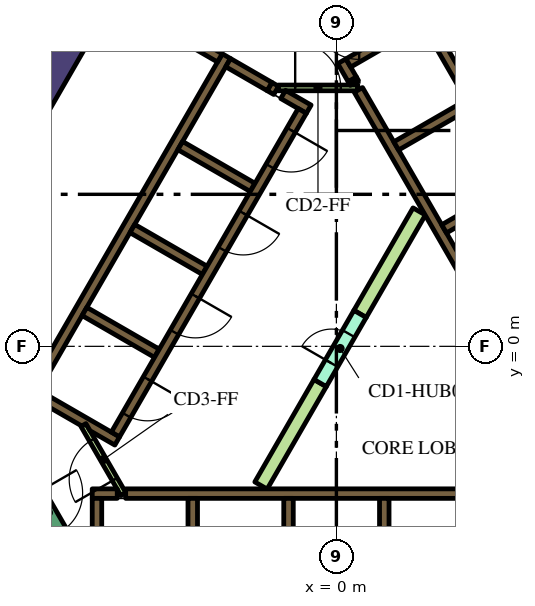
"""IFC4 building model, lengths in metres.
Left out: names, types, materials, properties, quantities, classifications, styles, units other than length and angle.
Written with IfcOpenShell. Run it as: python <this file> out.ifc"""

import sys

from ifc_helpers import new_model, si_unit, direction, frame, frame_2d, origin, place, context, subcontext, project, spatial, polyline, rectangle, outline, extrude, element, fill, save


model = new_model("IFC4")
c1 = context("Model", 3, precision=1e-05, world=origin(), true_north=direction((0.0, 1.0)))
c2 = subcontext(c1, "Body", "Model", "MODEL_VIEW")
j1 = project(units=[si_unit("LENGTHUNIT", "METRE"), si_unit("PLANEANGLEUNIT", "RADIAN")], contexts=[c1])
p1 = place(None, origin())
s1 = spatial("IfcSite", under=j1, at=p1, CompositionType="ELEMENT")
p2 = place(p1, origin())
s2 = spatial("IfcBuilding", under=s1, at=p2, CompositionType="ELEMENT")
p3 = place(p2, frame((0.0, 0.0, 179.4)))
s3 = spatial("IfcBuildingStorey", under=s2, at=p3, CompositionType="ELEMENT", Elevation=179.4)
p4 = place(p3, frame((-12.668, -1.842, 0.0), z_axis=(0.0, 0.0, 1.0), x_axis=(0.500003640647, 0.866023301845, 0.0)))
e1 = element("IfcWall", 1, at=p4, inside=s3, PredefinedType="SOLIDWALL", context=c2, shape_type="SweptSolid", body=[
    extrude(rectangle(XDim=15.858, YDim=0.8, at=frame_2d((7.929, 0.0))), origin(), (0.0, 0.0, 1.0), 4.2),
])
p5 = place(p3, frame((-5.545, -3.875, 0.0), z_axis=(0.0, 0.0, 1.0), x_axis=(1.0, 0.0, 0.0)))
e2 = element("IfcWall", 2, at=p5, inside=s3, PredefinedType="SOLIDWALL", context=c2, shape_type="SweptSolid", body=[
    extrude(rectangle(XDim=11.97, YDim=0.25, at=frame_2d((5.985, 0.0))), origin(), (0.0, 0.0, 1.0), 4.2),
])
p6 = place(p3, frame((-6.425, -3.875, 0.0), z_axis=(0.0, 0.0, 1.0), x_axis=(1.0, 0.0, 0.0)))
e3 = element("IfcWall", 3, at=p6, inside=s3, PredefinedType="SOLIDWALL", context=c2, shape_type="SweptSolid", body=[
    extrude(rectangle(XDim=0.658, YDim=0.25, at=frame_2d((0.329, 0.0))), origin(), (0.0, 0.0, 1.0), 4.2),
])
for number, where, z_axis, x_axis in (
    (4, (1.26, -4.0, 0.0), (0.0, 0.0, 1.0), (0.0, -1.0, 0.0)),
    (5, (-1.26, -4.0, 0.0), (0.0, 0.0, 1.0), (0.0, -1.0, 0.0)),
    (6, (-3.78, -4.0, 0.0), (0.0, 0.0, 1.0), (0.0, -1.0, 0.0)),
):
    element("IfcWall", number, at=place(p3, frame(where, z_axis=z_axis, x_axis=x_axis)), inside=s3, PredefinedType="SOLIDWALL", context=c2, shape_type="SweptSolid", body=[
        extrude(rectangle(XDim=2.2, YDim=0.25, at=frame_2d((1.1, 0.0))), origin(), (0.0, 0.0, 1.0), 4.2),
    ])
p7 = place(p3, frame((-6.3, -7.125, 0.0), z_axis=(0.0, 0.0, 1.0), x_axis=(0.0, 1.0, 0.0)))
e7 = element("IfcWall", 7, at=p7, inside=s3, PredefinedType="SOLIDWALL", context=c2, shape_type="SweptSolid", body=[
    extrude(rectangle(XDim=3.125, YDim=0.25, at=frame_2d((1.562, 0.0))), origin(), (0.0, 0.0, 1.0), 4.2),
])
p8 = place(p3, frame((0.473, 6.93, 0.0), z_axis=(0.0, 0.0, 1.0), x_axis=(-0.49972245349, 0.866185586049, 0.0)))
e8 = element("IfcWall", 8, at=p8, inside=s3, PredefinedType="SOLIDWALL", context=c2, shape_type="SweptSolid", body=[
    extrude(rectangle(XDim=0.11, YDim=0.25, at=frame_2d((0.055, 0.0))), origin(), (0.0, 0.0, 1.0), 4.2),
])
p9 = place(p3, frame((6.568, -3.627, 0.0), z_axis=(0.0, 0.0, 1.0), x_axis=(-0.499999455981, 0.866025717874, 0.0)))
e9 = element("IfcWall", 9, at=p9, inside=s3, PredefinedType="SOLIDWALL", context=c2, shape_type="SweptSolid", body=[
    extrude(rectangle(XDim=11.978, YDim=0.25, at=frame_2d((5.989, 0.0))), origin(), (0.0, 0.0, 1.0), 4.2),
])
p10 = place(p3, frame((0.417, 7.027, 0.0), z_axis=(0.0, 0.0, 1.0), x_axis=(-0.500210807569, 0.865903659763, 0.0)))
e10 = element("IfcWall", 10, at=p10, inside=s3, PredefinedType="SOLIDWALL", context=c2, shape_type="SweptSolid", body=[
    extrude(rectangle(XDim=0.548, YDim=0.25, at=frame_2d((0.274, 0.0))), origin(), (0.0, 0.0, 1.0), 4.2),
])
p11 = place(p3, frame((3.647, 9.38, 0.0), z_axis=(0.0, 0.0, 1.0), x_axis=(-0.866025015791, -0.500000672024, 0.0)))
e11 = element("IfcWall", 11, at=p11, inside=s3, PredefinedType="SOLIDWALL", context=c2, shape_type="SweptSolid", body=[
    extrude(rectangle(XDim=3.849, YDim=0.25, at=frame_2d((1.924, 0.0))), origin(), (0.0, 0.0, 1.0), 4.2),
])
p12 = place(p3, frame((1.574, 5.274, 0.0), z_axis=(0.0, 0.0, 1.0), x_axis=(0.866028486751, 0.499994660107, 0.0)))
e12 = element("IfcWall", 12, at=p12, inside=s3, PredefinedType="SOLIDWALL", context=c2, shape_type="SweptSolid", body=[
    extrude(rectangle(XDim=2.2, YDim=0.25, at=frame_2d((1.1, 0.0))), origin(), (0.0, 0.0, 1.0), 4.2),
])
p13 = place(p3, frame((2.834, 3.091, 0.0), z_axis=(0.0, 0.0, 1.0), x_axis=(0.866008176907, 0.50002983664, 0.0)))
e13 = element("IfcWall", 13, at=p13, inside=s3, PredefinedType="SOLIDWALL", context=c2, shape_type="SweptSolid", body=[
    extrude(rectangle(XDim=2.2, YDim=0.25, at=frame_2d((1.1, 0.0))), origin(), (0.0, 0.0, 1.0), 4.2),
])
p14 = place(p3, frame((-8.06, -1.311, 0.0), z_axis=(0.0, 0.0, 1.0), x_axis=(0.50000273126, 0.866023826885, 0.0)))
e14 = element("IfcWall", 14, at=p14, inside=s3, PredefinedType="SOLIDWALL", context=c2, shape_type="SweptSolid", body=[
    extrude(rectangle(XDim=10.33, YDim=0.25, at=frame_2d((5.165, 0.0))), origin(), (0.0, 0.0, 1.0), 4.2),
])
p15 = place(p3, frame((-1.758, 6.835, 0.0), z_axis=(0.0, 0.0, 1.0), x_axis=(0.865982457891, -0.500074377092, 0.0)))
e15 = element("IfcWall", 15, at=p15, inside=s3, PredefinedType="SOLIDWALL", context=c2, shape_type="SweptSolid", body=[
    extrude(rectangle(XDim=0.2, YDim=0.25, at=frame_2d((0.1, 0.0))), origin(), (0.0, 0.0, 1.0), 4.2),
])
p16 = place(p3, frame((-1.76, 6.836, 0.0), z_axis=(0.0, 0.0, 1.0), x_axis=(-0.865952863304, 0.500125622755, 0.0)))
e16 = element("IfcWall", 16, at=p16, inside=s3, PredefinedType="SOLIDWALL", context=c2, shape_type="SweptSolid", body=[
    extrude(rectangle(XDim=1.258, YDim=0.25, at=frame_2d((0.629, 0.0))), origin(), (0.0, 0.0, 1.0), 4.2),
])
p17 = place(p3, frame((-0.728, 6.24, 0.0), z_axis=(0.0, 0.0, 1.0), x_axis=(-0.865955664968, 0.500120771724, 0.0)))
e17 = element("IfcWall", 17, at=p17, inside=s3, PredefinedType="SOLIDWALL", context=c2, shape_type="SweptSolid", body=[
    extrude(rectangle(XDim=0.778, YDim=0.25, at=frame_2d((0.389, 0.0))), origin(), (0.0, 0.0, 1.0), 4.2),
])
for number, where, z_axis, x_axis in (
    (18, (-2.204, 4.182, 0.0), (0.0, 0.0, 1.0), (-0.866, 0.5, 0.0)),
    (19, (-5.369, 3.1, 0.0), (0.0, 0.0, 1.0), (0.866, -0.5, 0.0)),
    (20, (-4.724, -0.182, 0.0), (0.0, 0.0, 1.0), (-0.866, 0.5, 0.0)),
):
    element("IfcWall", number, at=place(p3, frame(where, z_axis=z_axis, x_axis=x_axis)), inside=s3, PredefinedType="SOLIDWALL", context=c2, shape_type="SweptSolid", body=[
        extrude(rectangle(XDim=2.2, YDim=0.25, at=frame_2d((1.1, 0.0))), origin(), (0.0, 0.0, 1.0), 4.2),
    ])
p18 = place(p3, origin())
e21 = element("IfcWall", 21, at=p18, inside=s3, PredefinedType="SOLIDWALL", context=c2, shape_type="SweptSolid", body=[
    extrude(outline(polyline([(-5.922, -2.257), (-5.922, -2.257), (-5.705, -2.382), (-5.83, -2.598), (-6.483, -2.221), (-6.591, -2.033), (-6.591, -2.033), (-6.7, -2.096), (-7.952, -1.373), (-7.827, -1.156), (-5.922, -2.257)])), origin(), (0.0, 0.0, 1.0), 4.2),
])
p19 = place(p3, frame((-3.066, 7.59, 0.0), z_axis=(0.0, 0.0, 1.0), x_axis=(-0.866081358704, 0.49990307071, 0.0)))
e22 = element("IfcWall", 22, at=p19, inside=s3, PredefinedType="SOLIDWALL", context=c2, shape_type="SweptSolid", body=[
    extrude(rectangle(XDim=0.858, YDim=0.25, at=frame_2d((0.429, 0.0))), origin(), (0.0, 0.0, 1.0), 4.2),
])
e23 = element("IfcWall", 23, at=p18, inside=s3, PredefinedType="PARTITIONING", context=c2, shape_type="SweptSolid", body=[
    extrude(outline(polyline([(2.017, 3.643), (2.342, 3.456), (0.785, 0.76), (0.46, 0.947), (2.017, 3.643)])), origin(), (0.0, 0.0, 1.0), 3.15),
])
e24 = element("IfcWall", 24, at=p18, inside=s3, PredefinedType="PARTITIONING", context=c2, shape_type="SweptSolid", body=[
    extrude(outline(polyline([(-0.59, -0.872), (-0.265, -1.059), (-1.822, -3.756), (-2.147, -3.568), (-0.59, -0.872)])), origin(), (0.0, 0.0, 1.0), 3.15),
])
p20 = place(p3, frame((8.565, -2.185, 0.0), z_axis=(0.0, 0.0, 1.0), x_axis=(-0.499997954832, 0.866026584559, 0.0)))
e25 = element("IfcWall", 25, at=p20, inside=s3, PredefinedType="SOLIDWALL", context=c2, shape_type="SweptSolid", body=[
    extrude(rectangle(XDim=12.35, YDim=0.25, at=frame_2d((6.175, 0.0))), origin(), (0.0, 0.0, 1.0), 4.2),
])
p21 = place(p20, frame((0.585, 0.0, 0.0)))
e26 = element("IfcOpeningElement", 26, at=p21, cuts=e25, PredefinedType="OPENING", context=c2, shape_type="SweptSolid", body=[
    extrude(rectangle(XDim=1.1, YDim=2.1, at=frame_2d((0.55, 1.05))), frame((0.0, 0.135, 0.0), z_axis=(0.0, -1.0, 0.0), x_axis=(1.0, 0.0, 0.0)), (0.0, 0.0, 1.0), 0.27),
])
p22 = place(p3, frame((-0.898, 6.194, 0.0), z_axis=(0.0, 0.0, 1.0), x_axis=(-0.499996202215, -0.866027596426, 0.0)))
e27 = element("IfcWall", 27, at=p22, inside=s3, PredefinedType="SOLIDWALL", context=c2, shape_type="SweptSolid", body=[
    extrude(rectangle(XDim=9.83, YDim=0.25, at=frame_2d((4.915, 0.0))), origin(), (0.0, 0.0, 1.0), 4.2),
])
p23 = place(p22, frame((0.585, 0.0, 0.0)))
e28 = element("IfcOpeningElement", 28, at=p23, cuts=e27, PredefinedType="OPENING", context=c2, shape_type="SweptSolid", body=[
    extrude(rectangle(XDim=1.1, YDim=2.1, at=frame_2d((0.55, 1.05))), frame((0.0, 0.135, 0.0), z_axis=(0.0, -1.0, 0.0), x_axis=(1.0, 0.0, 0.0)), (0.0, 0.0, 1.0), 0.27),
])
p24 = place(p22, frame((3.105, 0.0, 0.0)))
e29 = element("IfcOpeningElement", 29, at=p24, cuts=e27, PredefinedType="OPENING", context=c2, shape_type="SweptSolid", body=[
    extrude(rectangle(XDim=1.1, YDim=2.1, at=frame_2d((0.55, 1.05))), frame((0.0, 0.135, 0.0), z_axis=(0.0, -1.0, 0.0), x_axis=(1.0, 0.0, 0.0)), (0.0, 0.0, 1.0), 0.27),
])
p25 = place(p22, frame((5.625, 0.0, 0.0)))
e30 = element("IfcOpeningElement", 30, at=p25, cuts=e27, PredefinedType="OPENING", context=c2, shape_type="SweptSolid", body=[
    extrude(rectangle(XDim=1.1, YDim=2.1, at=frame_2d((0.55, 1.05))), frame((0.0, 0.135, 0.0), z_axis=(0.0, -1.0, 0.0), x_axis=(1.0, 0.0, 0.0)), (0.0, 0.0, 1.0), 0.27),
])
p26 = place(p22, frame((8.145, 0.0, 0.0)))
e31 = element("IfcOpeningElement", 31, at=p26, cuts=e27, PredefinedType="OPENING", context=c2, shape_type="SweptSolid", body=[
    extrude(rectangle(XDim=1.1, YDim=2.1, at=frame_2d((0.55, 1.05))), frame((0.0, 0.135, 0.0), z_axis=(0.0, -1.0, 0.0), x_axis=(1.0, 0.0, 0.0)), (0.0, 0.0, 1.0), 0.27),
])
p27 = place(p3, frame((-8.103, -3.466, 0.0), z_axis=(0.0, 0.0, 1.0), x_axis=(0.500078061341, -0.865980330357, 0.0)))
e32 = element("IfcWall", 32, at=p27, inside=s3, PredefinedType="SOLIDWALL", context=c2, shape_type="SweptSolid", body=[
    extrude(rectangle(XDim=2.1, YDim=0.4, at=frame_2d((1.05, 0.0))), origin(), (0.0, 0.0, 1.0), 4.2),
])
p28 = place(p27, frame((0.45, 0.0, 0.0)))
e33 = element("IfcOpeningElement", 33, at=p28, cuts=e32, PredefinedType="OPENING", context=c2, shape_type="SweptSolid", body=[
    extrude(rectangle(XDim=1.2, YDim=2.1, at=frame_2d((0.6, 1.05))), frame((0.0, 0.21, 0.0), z_axis=(0.0, -1.0, 0.0), x_axis=(1.0, 0.0, 0.0)), (0.0, 0.0, 1.0), 0.42),
])
p29 = place(p3, frame((-0.427, -0.966, 0.0), z_axis=(0.0, 0.0, 1.0), x_axis=(0.49994051562, 0.866059744384, 0.0)))
e34 = element("IfcWall", 34, at=p29, inside=s3, PredefinedType="PARTITIONING", context=c2, shape_type="SweptSolid", body=[
    extrude(rectangle(XDim=2.1, YDim=0.375, at=frame_2d((1.05, 0.0))), origin(), (0.0, 0.0, 1.0), 3.15),
])
p30 = place(p29, frame((0.6, 0.0, 0.0)))
e35 = element("IfcOpeningElement", 35, at=p30, cuts=e34, PredefinedType="OPENING", context=c2, shape_type="SweptSolid", body=[
    extrude(rectangle(XDim=0.9, YDim=2.1, at=frame_2d((0.45, 1.05))), frame((0.0, 0.198, 0.0), z_axis=(0.0, -1.0, 0.0), x_axis=(1.0, 0.0, 0.0)), (0.0, 0.0, 1.0), 0.395),
])
p31 = place(p3, frame((-1.534, 6.8, 0.0), z_axis=(0.0, 0.0, 1.0), x_axis=(1.0, 0.0, 0.0)))
e36 = element("IfcWall", 36, at=p31, inside=s3, PredefinedType="PARTITIONING", context=c2, shape_type="SweptSolid", body=[
    extrude(rectangle(XDim=2.1, YDim=0.15, at=frame_2d((1.05, 0.0))), origin(), (0.0, 0.0, 1.0), 3.15),
])
p32 = place(p31, frame((0.45, 0.0, 0.0)))
e37 = element("IfcOpeningElement", 37, at=p32, cuts=e36, PredefinedType="OPENING", context=c2, shape_type="SweptSolid", body=[
    extrude(rectangle(XDim=1.2, YDim=2.1, at=frame_2d((0.6, 1.05))), frame((0.0, 0.085, 0.0), z_axis=(0.0, -1.0, 0.0), x_axis=(1.0, 0.0, 0.0)), (0.0, 0.0, 1.0), 0.17),
])
p33 = place(p3, frame((-5.606, -3.89, 0.0), z_axis=(0.0, 0.0, 1.0), x_axis=(-0.500027713859, 0.866009402589, 0.0)))
e38 = element("IfcWall", 38, at=p33, inside=s3, PredefinedType="PARTITIONING", context=c2, shape_type="SweptSolid", body=[
    extrude(rectangle(XDim=2.1, YDim=0.15, at=frame_2d((1.05, 0.0))), origin(), (0.0, 0.0, 1.0), 3.15),
])
p34 = place(p33, frame((0.45, 0.0, 0.0)))
e39 = element("IfcOpeningElement", 39, at=p34, cuts=e38, PredefinedType="OPENING", context=c2, shape_type="SweptSolid", body=[
    extrude(rectangle(XDim=1.2, YDim=2.1, at=frame_2d((0.6, 1.05))), frame((0.0, 0.085, 0.0), z_axis=(0.0, -1.0, 0.0), x_axis=(1.0, 0.0, 0.0)), (0.0, 0.0, 1.0), 0.17),
])
p35 = place(p23, origin())
e40 = element("IfcDoor", 40, at=p35, inside=s3, OperationType="DOUBLE_DOOR_SLIDING", PredefinedType="DOOR", context=c2, shape_type="SweptSolid", body=[
    extrude(rectangle(XDim=1.1, YDim=2.1, at=frame_2d((0.55, 1.05))), frame((0.0, 0.025, 0.0), z_axis=(0.0, -1.0, 0.0), x_axis=(1.0, 0.0, 0.0)), (0.0, 0.0, 1.0), 0.05),
])
fill(e28, e40)
p36 = place(p24, origin())
e41 = element("IfcDoor", 41, at=p36, inside=s3, OperationType="DOUBLE_DOOR_SLIDING", PredefinedType="DOOR", context=c2, shape_type="SweptSolid", body=[
    extrude(rectangle(XDim=1.1, YDim=2.1, at=frame_2d((0.55, 1.05))), frame((0.0, 0.025, 0.0), z_axis=(0.0, -1.0, 0.0), x_axis=(1.0, 0.0, 0.0)), (0.0, 0.0, 1.0), 0.05),
])
fill(e29, e41)
p37 = place(p25, origin())
e42 = element("IfcDoor", 42, at=p37, inside=s3, OperationType="DOUBLE_DOOR_SLIDING", PredefinedType="DOOR", context=c2, shape_type="SweptSolid", body=[
    extrude(rectangle(XDim=1.1, YDim=2.1, at=frame_2d((0.55, 1.05))), frame((0.0, 0.025, 0.0), z_axis=(0.0, -1.0, 0.0), x_axis=(1.0, 0.0, 0.0)), (0.0, 0.0, 1.0), 0.05),
])
fill(e30, e42)
p38 = place(p26, origin())
e43 = element("IfcDoor", 43, at=p38, inside=s3, OperationType="DOUBLE_DOOR_SLIDING", PredefinedType="DOOR", context=c2, shape_type="SweptSolid", body=[
    extrude(rectangle(XDim=1.1, YDim=2.1, at=frame_2d((0.55, 1.05))), frame((0.0, 0.025, 0.0), z_axis=(0.0, -1.0, 0.0), x_axis=(1.0, 0.0, 0.0)), (0.0, 0.0, 1.0), 0.05),
])
fill(e31, e43)
p39 = place(p28, origin())
e44 = element("IfcDoor", 44, at=p39, inside=s3, OperationType="SINGLE_SWING_LEFT", PredefinedType="DOOR", context=c2, shape_type="SweptSolid", body=[
    extrude(rectangle(XDim=1.2, YDim=2.1, at=frame_2d((0.6, 1.05))), frame((0.0, 0.025, 0.0), z_axis=(0.0, -1.0, 0.0), x_axis=(1.0, 0.0, 0.0)), (0.0, 0.0, 1.0), 0.05),
])
fill(e33, e44)
p40 = place(p30, origin())
e45 = element("IfcDoor", 45, at=p40, inside=s3, OperationType="SINGLE_SWING_LEFT", PredefinedType="DOOR", context=c2, shape_type="SweptSolid", body=[
    extrude(rectangle(XDim=0.9, YDim=2.1, at=frame_2d((0.45, 1.05))), frame((0.0, 0.025, 0.0), z_axis=(0.0, -1.0, 0.0), x_axis=(1.0, 0.0, 0.0)), (0.0, 0.0, 1.0), 0.05),
])
fill(e35, e45)
p41 = place(p32, origin())
e46 = element("IfcDoor", 46, at=p41, inside=s3, OperationType="SINGLE_SWING_LEFT", PredefinedType="DOOR", context=c2, shape_type="SweptSolid", body=[
    extrude(rectangle(XDim=1.2, YDim=2.1, at=frame_2d((0.6, 1.05))), frame((0.0, 0.025, 0.0), z_axis=(0.0, -1.0, 0.0), x_axis=(1.0, 0.0, 0.0)), (0.0, 0.0, 1.0), 0.05),
])
fill(e37, e46)
p42 = place(p34, origin())
e47 = element("IfcDoor", 47, at=p42, inside=s3, OperationType="SINGLE_SWING_LEFT", PredefinedType="DOOR", context=c2, shape_type="SweptSolid", body=[
    extrude(rectangle(XDim=1.2, YDim=2.1, at=frame_2d((0.6, 1.05))), frame((0.0, 0.025, 0.0), z_axis=(0.0, -1.0, 0.0), x_axis=(1.0, 0.0, 0.0)), (0.0, 0.0, 1.0), 0.05),
])
fill(e39, e47)
save(model, sys.argv[1])
